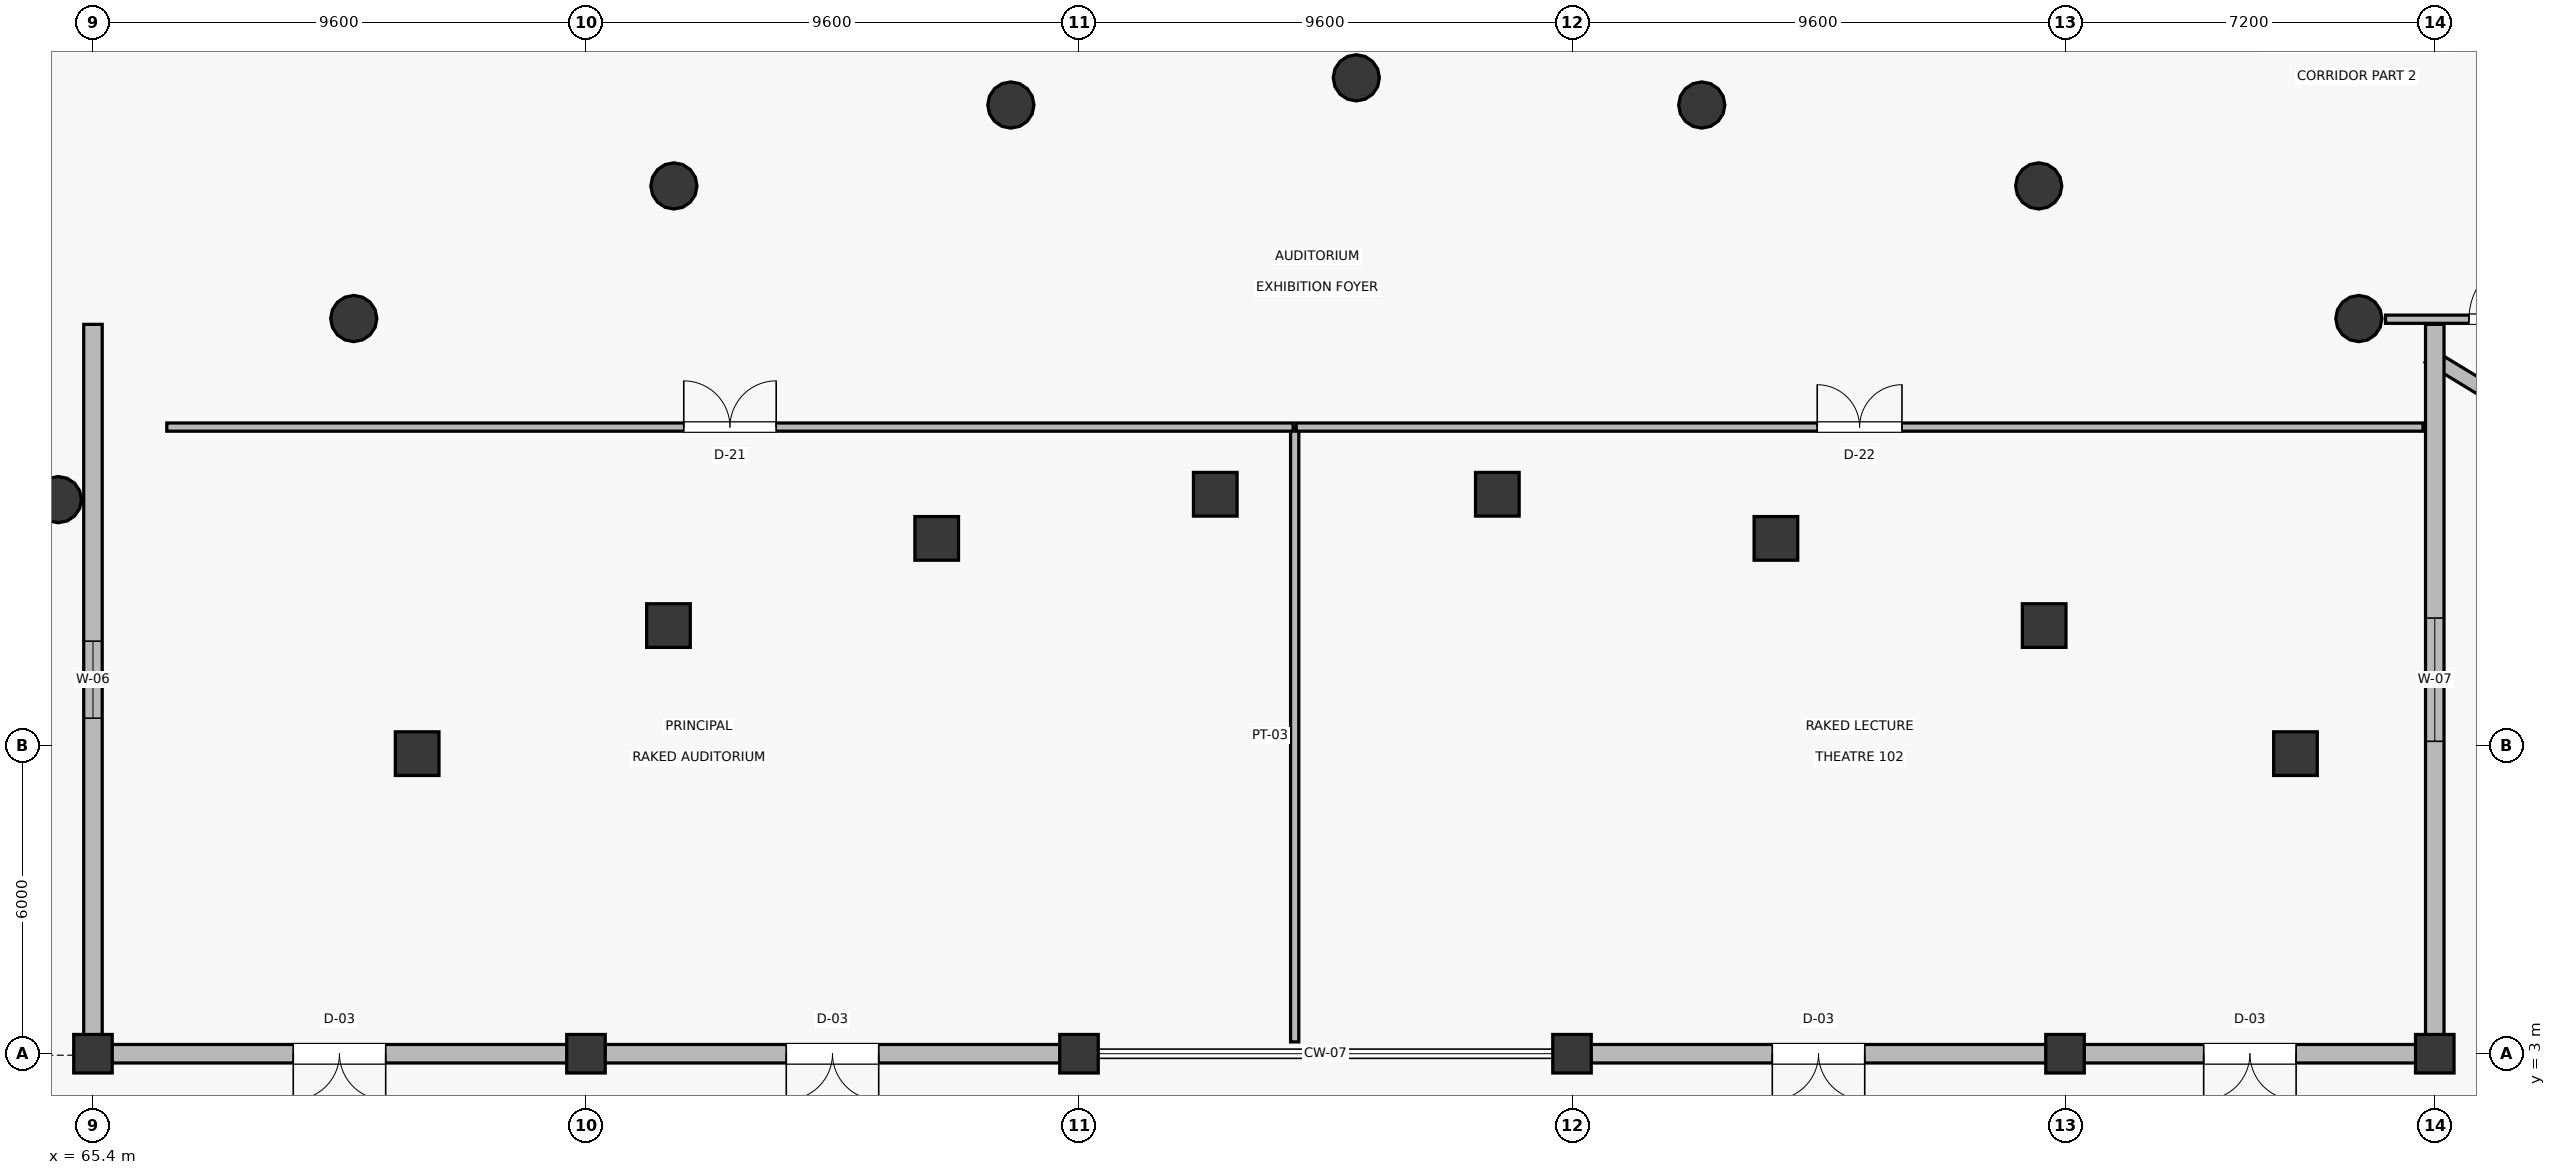
"""IFC4 building model, lengths in metres.
Left out: names, types, materials, properties, quantities, classifications, styles, units other than length and angle.
Written with IfcOpenShell. Run it as: python <this file> out.ifc"""

import sys

from ifc_helpers import new_model, si_unit, direction, frame, frame_2d, origin, origin_2d, place, context, subcontext, project, spatial, rectangle, circle, extrude, element, fill, save


model = new_model("IFC4")
c1 = context("Model", 3, precision=1e-05, world=origin(), true_north=direction((0.0, 1.0)))
c2 = subcontext(c1, "Body", "Model", "MODEL_VIEW")
j1 = project(units=[si_unit("LENGTHUNIT", "METRE"), si_unit("PLANEANGLEUNIT", "RADIAN")], contexts=[c1])
p1 = place(None, origin())
s1 = spatial("IfcSite", under=j1, at=p1, CompositionType="ELEMENT")
p2 = place(p1, origin())
s2 = spatial("IfcBuilding", under=s1, at=p2, CompositionType="ELEMENT")
p3 = place(p2, origin())
s3 = spatial("IfcBuildingStorey", under=s2, at=p3, CompositionType="ELEMENT", Elevation=0.0)
for number, where, z_axis, x_axis in (
    (1, (71.713, 8.842, 0.0), (0.0, 0.0, 1.0), (1.0, 0.0, 0.0)),
    (2, (76.606, 11.336, 0.0), (0.0, 0.0, 1.0), (1.0, 0.0, 0.0)),
    (3, (81.829, 13.033, 0.0), (0.0, 0.0, 1.0), (1.0, 0.0, 0.0)),
    (4, (87.254, 13.892, 0.0), (0.0, 0.0, 1.0), (1.0, 0.0, 0.0)),
    (5, (92.746, 13.892, 0.0), (0.0, 0.0, 1.0), (1.0, 0.0, 0.0)),
    (6, (98.171, 13.033, 0.0), (0.0, 0.0, 1.0), (1.0, 0.0, 0.0)),
    (7, (103.394, 11.336, 0.0), (0.0, 0.0, 1.0), (1.0, 0.0, 0.0)),
    (8, (108.287, 8.842, 0.0), (0.0, 0.0, 1.0), (1.0, 0.0, 0.0)),
):
    element("IfcColumn", number, at=place(p3, frame(where, z_axis=z_axis, x_axis=x_axis)), inside=s3, PredefinedType="COLUMN", context=c2, shape_type="SweptSolid", body=[
        extrude(rectangle(XDim=0.85, YDim=0.85, at=origin_2d()), origin(), (0.0, 0.0, 1.0), 5.4),
    ])
for number, where, z_axis, x_axis in (
    (9, (65.4, 3.0, 0.0), (0.0, 0.0, 1.0), (1.0, 0.0, 0.0)),
    (10, (75.0, 3.0, 0.0), (0.0, 0.0, 1.0), (1.0, 0.0, 0.0)),
    (11, (84.6, 3.0, 0.0), (0.0, 0.0, 1.0), (1.0, 0.0, 0.0)),
    (12, (94.2, 3.0, 0.0), (0.0, 0.0, 1.0), (1.0, 0.0, 0.0)),
    (13, (103.8, 3.0, 0.0), (0.0, 0.0, 1.0), (1.0, 0.0, 0.0)),
    (14, (111.0, 3.0, 0.0), (0.0, 0.0, 1.0), (1.0, 0.0, 0.0)),
):
    element("IfcColumn", number, at=place(p3, frame(where, z_axis=z_axis, x_axis=x_axis)), inside=s3, PredefinedType="COLUMN", context=c2, shape_type="SweptSolid", body=[
        extrude(rectangle(XDim=0.75, YDim=0.75, at=origin_2d()), origin(), (0.0, 0.0, 1.0), 5.4),
    ])
for number, where, z_axis, x_axis in (
    (15, (64.725, 13.788, 0.0), (0.0, 0.0, 1.0), (1.0, 0.0, 0.0)),
    (16, (70.479, 17.313, 0.0), (0.0, 0.0, 1.0), (1.0, 0.0, 0.0)),
    (17, (76.712, 19.896, 0.0), (0.0, 0.0, 1.0), (1.0, 0.0, 0.0)),
    (18, (83.273, 21.471, 0.0), (0.0, 0.0, 1.0), (1.0, 0.0, 0.0)),
    (19, (90.0, 22.0, 0.0), (0.0, 0.0, 1.0), (1.0, 0.0, 0.0)),
    (20, (96.727, 21.471, 0.0), (0.0, 0.0, 1.0), (1.0, 0.0, 0.0)),
    (21, (103.288, 19.896, 0.0), (0.0, 0.0, 1.0), (1.0, 0.0, 0.0)),
    (22, (109.521, 17.313, 0.0), (0.0, 0.0, 1.0), (1.0, 0.0, 0.0)),
):
    element("IfcColumn", number, at=place(p3, frame(where, z_axis=z_axis, x_axis=x_axis)), inside=s3, PredefinedType="COLUMN", context=c2, shape_type="SweptSolid", body=[
        extrude(circle(Radius=0.45, at=origin_2d()), origin(), (0.0, 0.0, 1.0), 5.4),
    ])
p4 = place(p3, frame((110.885, 16.587, 0.0), z_axis=(0.0, 0.0, 1.0), x_axis=(0.85452447533, -0.519411129128, 0.0)))
e23 = element("IfcWall", 23, at=p4, inside=s3, PredefinedType="SOLIDWALL", context=c2, shape_type="SweptSolid", body=[
    extrude(rectangle(XDim=3.354, YDim=0.29, at=frame_2d((1.677, 0.0))), origin(), (0.0, 0.0, 1.0), 4.305),
])
p5 = place(p3, frame((65.765, 3.0, 0.0), z_axis=(0.0, 0.0, 1.0), x_axis=(1.0, 0.0, 0.0)))
e24 = element("IfcWall", 24, at=p5, inside=s3, PredefinedType="SOLIDWALL", context=c2, shape_type="SweptSolid", body=[
    extrude(rectangle(XDim=8.87, YDim=0.36, at=frame_2d((4.435, 0.0))), origin(), (0.0, 0.0, 1.0), 4.045),
])
p6 = place(p5, frame((3.535, 0.0, 0.0)))
e25 = element("IfcOpeningElement", 25, at=p6, cuts=e24, PredefinedType="OPENING", context=c2, shape_type="SweptSolid", body=[
    extrude(rectangle(XDim=1.8, YDim=2.3, at=frame_2d((0.9, 1.15))), frame((0.0, 0.19, 0.0), z_axis=(0.0, -1.0, 0.0), x_axis=(1.0, 0.0, 0.0)), (0.0, 0.0, 1.0), 0.38),
])
p7 = place(p3, frame((75.365, 3.0, 0.0), z_axis=(0.0, 0.0, 1.0), x_axis=(1.0, 0.0, 0.0)))
e26 = element("IfcWall", 26, at=p7, inside=s3, PredefinedType="SOLIDWALL", context=c2, shape_type="SweptSolid", body=[
    extrude(rectangle(XDim=8.87, YDim=0.36, at=frame_2d((4.435, 0.0))), origin(), (0.0, 0.0, 1.0), 4.415),
])
p8 = place(p7, frame((3.535, 0.0, 0.0)))
e27 = element("IfcOpeningElement", 27, at=p8, cuts=e26, PredefinedType="OPENING", context=c2, shape_type="SweptSolid", body=[
    extrude(rectangle(XDim=1.8, YDim=2.3, at=frame_2d((0.9, 1.15))), frame((0.0, 0.19, 0.0), z_axis=(0.0, -1.0, 0.0), x_axis=(1.0, 0.0, 0.0)), (0.0, 0.0, 1.0), 0.38),
])
p9 = place(p3, frame((94.565, 3.0, 0.0), z_axis=(0.0, 0.0, 1.0), x_axis=(1.0, 0.0, 0.0)))
e28 = element("IfcWall", 28, at=p9, inside=s3, PredefinedType="SOLIDWALL", context=c2, shape_type="SweptSolid", body=[
    extrude(rectangle(XDim=8.87, YDim=0.36, at=frame_2d((4.435, 0.0))), origin(), (0.0, 0.0, 1.0), 4.415),
])
p10 = place(p9, frame((3.535, 0.0, 0.0)))
e29 = element("IfcOpeningElement", 29, at=p10, cuts=e28, PredefinedType="OPENING", context=c2, shape_type="SweptSolid", body=[
    extrude(rectangle(XDim=1.8, YDim=2.3, at=frame_2d((0.9, 1.15))), frame((0.0, 0.19, 0.0), z_axis=(0.0, -1.0, 0.0), x_axis=(1.0, 0.0, 0.0)), (0.0, 0.0, 1.0), 0.38),
])
p11 = place(p3, frame((104.165, 3.0, 0.0), z_axis=(0.0, 0.0, 1.0), x_axis=(1.0, 0.0, 0.0)))
e30 = element("IfcWall", 30, at=p11, inside=s3, PredefinedType="SOLIDWALL", context=c2, shape_type="SweptSolid", body=[
    extrude(rectangle(XDim=6.47, YDim=0.36, at=frame_2d((3.235, 0.0))), origin(), (0.0, 0.0, 1.0), 4.415),
])
p12 = place(p11, frame((2.335, 0.0, 0.0)))
e31 = element("IfcOpeningElement", 31, at=p12, cuts=e30, PredefinedType="OPENING", context=c2, shape_type="SweptSolid", body=[
    extrude(rectangle(XDim=1.8, YDim=2.3, at=frame_2d((0.9, 1.15))), frame((0.0, 0.19, 0.0), z_axis=(0.0, -1.0, 0.0), x_axis=(1.0, 0.0, 0.0)), (0.0, 0.0, 1.0), 0.38),
])
p13 = place(p3, frame((65.4, 3.365, 0.0), z_axis=(0.0, 0.0, 1.0), x_axis=(0.0, 1.0, 0.0)))
e32 = element("IfcWall", 32, at=p13, inside=s3, PredefinedType="SOLIDWALL", context=c2, shape_type="SweptSolid", body=[
    extrude(rectangle(XDim=13.835, YDim=0.36, at=frame_2d((6.917, 0.0))), origin(), (0.0, 0.0, 1.0), 4.045),
])
p14 = place(p13, frame((6.167, 0.0, 1.0)))
e33 = element("IfcOpeningElement", 33, at=p14, cuts=e32, PredefinedType="OPENING", context=c2, shape_type="SweptSolid", body=[
    extrude(rectangle(XDim=1.5, YDim=1.9, at=frame_2d((0.75, 0.95))), frame((0.0, 0.19, 0.0), z_axis=(0.0, -1.0, 0.0), x_axis=(1.0, 0.0, 0.0)), (0.0, 0.0, 1.0), 0.38),
])
p15 = place(p3, frame((111.0, 3.365, 0.0), z_axis=(0.0, 0.0, 1.0), x_axis=(0.0, 1.0, 0.0)))
e34 = element("IfcWall", 34, at=p15, inside=s3, PredefinedType="SOLIDWALL", context=c2, shape_type="SweptSolid", body=[
    extrude(rectangle(XDim=13.835, YDim=0.36, at=frame_2d((6.917, 0.0))), origin(), (0.0, 0.0, 1.0), 4.305),
])
p16 = place(p15, frame((5.718, 0.0, 1.0)))
e35 = element("IfcOpeningElement", 35, at=p16, cuts=e34, PredefinedType="OPENING", context=c2, shape_type="SweptSolid", body=[
    extrude(rectangle(XDim=2.4, YDim=1.95, at=frame_2d((1.2, 0.975))), frame((0.0, 0.19, 0.0), z_axis=(0.0, -1.0, 0.0), x_axis=(1.0, 0.0, 0.0)), (0.0, 0.0, 1.0), 0.38),
])
p17 = place(p3, frame((88.8, 3.23, 0.0), z_axis=(0.0, 0.0, 1.0), x_axis=(0.0, 1.0, 0.0)))
e36 = element("IfcWall", 36, at=p17, inside=s3, PredefinedType="PARTITIONING", context=c2, shape_type="SweptSolid", body=[
    extrude(rectangle(XDim=11.94, YDim=0.16, at=frame_2d((5.97, 0.0))), origin(), (0.0, 0.0, 1.0), 4.155),
])
p18 = place(p3, frame((66.838, 15.2, 0.0), z_axis=(0.0, 0.0, 1.0), x_axis=(1.0, 0.0, 0.0)))
e37 = element("IfcWall", 37, at=p18, inside=s3, PredefinedType="PARTITIONING", context=c2, shape_type="SweptSolid", body=[
    extrude(rectangle(XDim=21.932, YDim=0.16, at=frame_2d((10.966, 0.0))), origin(), (0.0, 0.0, 1.0), 4.265),
])
p19 = place(p18, frame((10.066, 0.0, 0.0)))
e38 = element("IfcOpeningElement", 38, at=p19, cuts=e37, PredefinedType="OPENING", context=c2, shape_type="SweptSolid", body=[
    extrude(rectangle(XDim=1.8, YDim=2.35, at=frame_2d((0.9, 1.175))), frame((0.0, 0.09, 0.0), z_axis=(0.0, -1.0, 0.0), x_axis=(1.0, 0.0, 0.0)), (0.0, 0.0, 1.0), 0.18),
])
p20 = place(p3, frame((88.83, 15.2, 0.0), z_axis=(0.0, 0.0, 1.0), x_axis=(1.0, 0.0, 0.0)))
e39 = element("IfcWall", 39, at=p20, inside=s3, PredefinedType="PARTITIONING", context=c2, shape_type="SweptSolid", body=[
    extrude(rectangle(XDim=21.94, YDim=0.16, at=frame_2d((10.97, 0.0))), origin(), (0.0, 0.0, 1.0), 4.305),
])
p21 = place(p20, frame((10.145, 0.0, 0.0)))
e40 = element("IfcOpeningElement", 40, at=p21, cuts=e39, PredefinedType="OPENING", context=c2, shape_type="SweptSolid", body=[
    extrude(rectangle(XDim=1.65, YDim=2.3, at=frame_2d((0.825, 1.15))), frame((0.0, 0.09, 0.0), z_axis=(0.0, -1.0, 0.0), x_axis=(1.0, 0.0, 0.0)), (0.0, 0.0, 1.0), 0.18),
])
p22 = place(p3, frame((110.041, 17.3, 0.0), z_axis=(0.0, 0.0, 1.0), x_axis=(1.0, 0.0, 0.0)))
e41 = element("IfcWall", 41, at=p22, inside=s3, PredefinedType="PARTITIONING", context=c2, shape_type="SweptSolid", body=[
    extrude(rectangle(XDim=3.779, YDim=0.16, at=frame_2d((1.89, 0.0))), origin(), (0.0, 0.0, 1.0), 4.305),
])
p23 = place(p22, frame((1.625, 0.0, 0.0)))
e42 = element("IfcOpeningElement", 42, at=p23, cuts=e41, PredefinedType="OPENING", context=c2, shape_type="SweptSolid", body=[
    extrude(rectangle(XDim=1.25, YDim=2.2, at=frame_2d((0.625, 1.1))), frame((0.0, 0.09, 0.0), z_axis=(0.0, -1.0, 0.0), x_axis=(1.0, 0.0, 0.0)), (0.0, 0.0, 1.0), 0.18),
])
p24 = place(p6, frame((1.8, 0.0, 0.0), z_axis=(0.0, 0.0, 1.0), x_axis=(-1.0, 0.0, 0.0)))
e43 = element("IfcDoor", 43, at=p24, inside=s3, OperationType="DOUBLE_DOOR_SINGLE_SWING", PredefinedType="DOOR", context=c2, shape_type="SweptSolid", body=[
    extrude(rectangle(XDim=1.8, YDim=2.3, at=frame_2d((0.9, 1.15))), frame((0.0, 0.025, 0.0), z_axis=(0.0, -1.0, 0.0), x_axis=(1.0, 0.0, 0.0)), (0.0, 0.0, 1.0), 0.05),
])
fill(e25, e43)
p25 = place(p8, frame((1.8, 0.0, 0.0), z_axis=(0.0, 0.0, 1.0), x_axis=(-1.0, 0.0, 0.0)))
e44 = element("IfcDoor", 44, at=p25, inside=s3, OperationType="DOUBLE_DOOR_SINGLE_SWING", PredefinedType="DOOR", context=c2, shape_type="SweptSolid", body=[
    extrude(rectangle(XDim=1.8, YDim=2.3, at=frame_2d((0.9, 1.15))), frame((0.0, 0.025, 0.0), z_axis=(0.0, -1.0, 0.0), x_axis=(1.0, 0.0, 0.0)), (0.0, 0.0, 1.0), 0.05),
])
fill(e27, e44)
p26 = place(p10, frame((1.8, 0.0, 0.0), z_axis=(0.0, 0.0, 1.0), x_axis=(-1.0, 0.0, 0.0)))
e45 = element("IfcDoor", 45, at=p26, inside=s3, OperationType="DOUBLE_DOOR_SINGLE_SWING", PredefinedType="DOOR", context=c2, shape_type="SweptSolid", body=[
    extrude(rectangle(XDim=1.8, YDim=2.3, at=frame_2d((0.9, 1.15))), frame((0.0, 0.025, 0.0), z_axis=(0.0, -1.0, 0.0), x_axis=(1.0, 0.0, 0.0)), (0.0, 0.0, 1.0), 0.05),
])
fill(e29, e45)
p27 = place(p12, frame((1.8, 0.0, 0.0), z_axis=(0.0, 0.0, 1.0), x_axis=(-1.0, 0.0, 0.0)))
e46 = element("IfcDoor", 46, at=p27, inside=s3, OperationType="DOUBLE_DOOR_SINGLE_SWING", PredefinedType="DOOR", context=c2, shape_type="SweptSolid", body=[
    extrude(rectangle(XDim=1.8, YDim=2.3, at=frame_2d((0.9, 1.15))), frame((0.0, 0.025, 0.0), z_axis=(0.0, -1.0, 0.0), x_axis=(1.0, 0.0, 0.0)), (0.0, 0.0, 1.0), 0.05),
])
fill(e31, e46)
p28 = place(p14, origin())
e47 = element("IfcWindow", 47, at=p28, inside=s3, PartitioningType="DOUBLE_PANEL_VERTICAL", PredefinedType="WINDOW", context=c2, shape_type="SweptSolid", body=[
    extrude(rectangle(XDim=1.5, YDim=1.9, at=frame_2d((0.75, 0.95))), frame((0.0, 0.03, 0.0), z_axis=(0.0, -1.0, 0.0), x_axis=(1.0, 0.0, 0.0)), (0.0, 0.0, 1.0), 0.06),
])
fill(e33, e47)
p29 = place(p16, frame((2.4, 0.0, 0.0), z_axis=(0.0, 0.0, 1.0), x_axis=(-1.0, 0.0, 0.0)))
e48 = element("IfcWindow", 48, at=p29, inside=s3, PartitioningType="DOUBLE_PANEL_VERTICAL", PredefinedType="WINDOW", context=c2, shape_type="SweptSolid", body=[
    extrude(rectangle(XDim=2.4, YDim=1.95, at=frame_2d((1.2, 0.975))), frame((0.0, 0.03, 0.0), z_axis=(0.0, -1.0, 0.0), x_axis=(1.0, 0.0, 0.0)), (0.0, 0.0, 1.0), 0.06),
])
fill(e35, e48)
p30 = place(p19, origin())
e49 = element("IfcDoor", 49, at=p30, inside=s3, OperationType="DOUBLE_DOOR_SINGLE_SWING", PredefinedType="DOOR", context=c2, shape_type="SweptSolid", body=[
    extrude(rectangle(XDim=1.8, YDim=2.35, at=frame_2d((0.9, 1.175))), frame((0.0, 0.025, 0.0), z_axis=(0.0, -1.0, 0.0), x_axis=(1.0, 0.0, 0.0)), (0.0, 0.0, 1.0), 0.05),
])
fill(e38, e49)
p31 = place(p21, origin())
e50 = element("IfcDoor", 50, at=p31, inside=s3, OperationType="DOUBLE_DOOR_SINGLE_SWING", PredefinedType="DOOR", context=c2, shape_type="SweptSolid", body=[
    extrude(rectangle(XDim=1.65, YDim=2.3, at=frame_2d((0.825, 1.15))), frame((0.0, 0.025, 0.0), z_axis=(0.0, -1.0, 0.0), x_axis=(1.0, 0.0, 0.0)), (0.0, 0.0, 1.0), 0.05),
])
fill(e40, e50)
p32 = place(p23, origin())
e51 = element("IfcDoor", 51, at=p32, inside=s3, OperationType="SINGLE_SWING_RIGHT", PredefinedType="DOOR", context=c2, shape_type="SweptSolid", body=[
    extrude(rectangle(XDim=1.25, YDim=2.2, at=frame_2d((0.625, 1.1))), frame((0.0, 0.025, 0.0), z_axis=(0.0, -1.0, 0.0), x_axis=(1.0, 0.0, 0.0)), (0.0, 0.0, 1.0), 0.05),
])
fill(e42, e51)
save(model, sys.argv[1])
